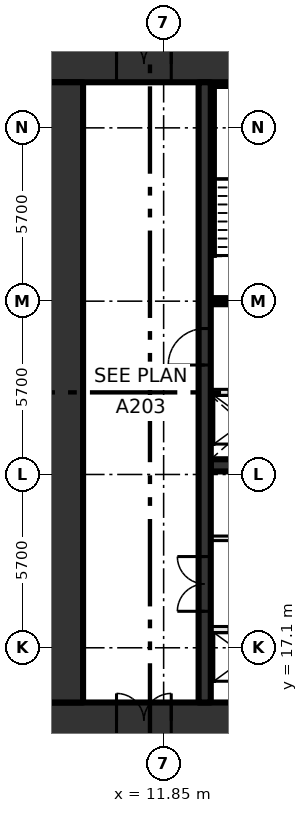
"""IFC4 building model, lengths in metres.
Left out: names, types, materials, properties, quantities, classifications, styles, units other than length and angle.
Written with IfcOpenShell. Run it as: python <this file> out.ifc"""

import sys

from ifc_helpers import new_model, si_unit, direction, frame, frame_2d, origin, place, context, subcontext, project, spatial, rectangle, extrude, element, fill, save


model = new_model("IFC4")
c1 = context("Model", 3, precision=1e-05, world=origin(), true_north=direction((0.0, 1.0)))
c2 = subcontext(c1, "Body", "Model", "MODEL_VIEW")
j1 = project(units=[si_unit("LENGTHUNIT", "METRE"), si_unit("PLANEANGLEUNIT", "RADIAN")], contexts=[c1])
p1 = place(None, origin())
s1 = spatial("IfcSite", under=j1, at=p1, CompositionType="ELEMENT")
p2 = place(p1, origin())
s2 = spatial("IfcBuilding", under=s1, at=p2, CompositionType="ELEMENT")
p3 = place(p2, origin())
s3 = spatial("IfcBuildingStorey", under=s2, at=p3, CompositionType="ELEMENT", Elevation=0.0)
p4 = place(p3, frame((8.0, 14.7, -0.45), z_axis=(0.0, 0.0, 1.0), x_axis=(1.0, 0.0, 0.0)))
e1 = element("IfcWall", 1, at=p4, inside=s3, PredefinedType="SHEAR", context=c2, shape_type="SweptSolid", body=[
    extrude(rectangle(XDim=22.8, YDim=1.2, at=frame_2d((11.4, 0.0))), origin(), (0.0, 0.0, 1.0), 7.2),
])
p5 = place(p4, frame((2.3, 0.0, 0.45)))
e2 = element("IfcOpeningElement", 2, at=p5, cuts=e1, PredefinedType="OPENING", context=c2, shape_type="SweptSolid", body=[
    extrude(rectangle(XDim=1.8, YDim=2.1, at=frame_2d((0.9, 1.05))), frame((0.0, 0.61, 0.0), z_axis=(0.0, -1.0, 0.0), x_axis=(1.0, 0.0, 0.0)), (0.0, 0.0, 1.0), 1.22),
])
p6 = place(p3, frame((8.0, 36.3, -0.45), z_axis=(0.0, 0.0, 1.0), x_axis=(1.0, 0.0, 0.0)))
e3 = element("IfcWall", 3, at=p6, inside=s3, PredefinedType="SHEAR", context=c2, shape_type="SweptSolid", body=[
    extrude(rectangle(XDim=22.8, YDim=1.2, at=frame_2d((11.4, 0.0))), origin(), (0.0, 0.0, 1.0), 7.2),
])
p7 = place(p6, frame((2.3, 0.0, 0.45)))
e4 = element("IfcOpeningElement", 4, at=p7, cuts=e3, PredefinedType="OPENING", context=c2, shape_type="SweptSolid", body=[
    extrude(rectangle(XDim=1.8, YDim=2.1, at=frame_2d((0.9, 1.05))), frame((0.0, 0.61, 0.0), z_axis=(0.0, -1.0, 0.0), x_axis=(1.0, 0.0, 0.0)), (0.0, 0.0, 1.0), 1.22),
])
p8 = place(p3, frame((8.6, 15.3, -0.45), z_axis=(0.0, 0.0, 1.0), x_axis=(0.0, 1.0, 0.0)))
e5 = element("IfcWall", 5, at=p8, inside=s3, PredefinedType="SHEAR", context=c2, shape_type="SweptSolid", body=[
    extrude(rectangle(XDim=20.4, YDim=1.2, at=frame_2d((10.2, 0.0))), origin(), (0.0, 0.0, 1.0), 7.2),
])
p9 = place(p3, frame((13.4, 17.7, 0.0), z_axis=(0.0, 0.0, 1.0), x_axis=(1.0, 0.0, 0.0)))
e6 = element("IfcWall", 6, at=p9, inside=s3, PredefinedType="SOLIDWALL", context=c2, shape_type="SweptSolid", body=[
    extrude(rectangle(XDim=13.4, YDim=0.2, at=frame_2d((6.7, 0.0))), origin(), (0.0, 0.0, 1.0), 6.75),
])
p10 = place(p9, frame((0.6, 0.0, 0.0)))
e7 = element("IfcOpeningElement", 7, at=p10, cuts=e6, PredefinedType="OPENING", context=c2, shape_type="SweptSolid", body=[
    extrude(rectangle(XDim=1.1, YDim=2.1, at=frame_2d((0.55, 1.05))), frame((0.0, 0.11, 0.0), z_axis=(0.0, -1.0, 0.0), x_axis=(1.0, 0.0, 0.0)), (0.0, 0.0, 1.0), 0.22),
])
p11 = place(p9, frame((3.3, 0.0, 0.0)))
e8 = element("IfcOpeningElement", 8, at=p11, cuts=e6, PredefinedType="OPENING", context=c2, shape_type="SweptSolid", body=[
    extrude(rectangle(XDim=1.1, YDim=2.1, at=frame_2d((0.55, 1.05))), frame((0.0, 0.11, 0.0), z_axis=(0.0, -1.0, 0.0), x_axis=(1.0, 0.0, 0.0)), (0.0, 0.0, 1.0), 0.22),
])
p12 = place(p9, frame((6.0, 0.0, 0.0)))
e9 = element("IfcOpeningElement", 9, at=p12, cuts=e6, PredefinedType="OPENING", context=c2, shape_type="SweptSolid", body=[
    extrude(rectangle(XDim=1.1, YDim=2.1, at=frame_2d((0.55, 1.05))), frame((0.0, 0.11, 0.0), z_axis=(0.0, -1.0, 0.0), x_axis=(1.0, 0.0, 0.0)), (0.0, 0.0, 1.0), 0.22),
])
p13 = place(p9, frame((8.7, 0.0, 0.0)))
e10 = element("IfcOpeningElement", 10, at=p13, cuts=e6, PredefinedType="OPENING", context=c2, shape_type="SweptSolid", body=[
    extrude(rectangle(XDim=1.1, YDim=2.1, at=frame_2d((0.55, 1.05))), frame((0.0, 0.11, 0.0), z_axis=(0.0, -1.0, 0.0), x_axis=(1.0, 0.0, 0.0)), (0.0, 0.0, 1.0), 0.22),
])
p14 = place(p9, frame((11.4, 0.0, 0.0)))
e11 = element("IfcOpeningElement", 11, at=p14, cuts=e6, PredefinedType="OPENING", context=c2, shape_type="SweptSolid", body=[
    extrude(rectangle(XDim=1.1, YDim=2.1, at=frame_2d((0.55, 1.05))), frame((0.0, 0.11, 0.0), z_axis=(0.0, -1.0, 0.0), x_axis=(1.0, 0.0, 0.0)), (0.0, 0.0, 1.0), 0.22),
])
p15 = place(p3, frame((13.4, 20.7, 0.0), z_axis=(0.0, 0.0, 1.0), x_axis=(1.0, 0.0, 0.0)))
e12 = element("IfcWall", 12, at=p15, inside=s3, PredefinedType="PARTITIONING", context=c2, shape_type="SweptSolid", body=[
    extrude(rectangle(XDim=13.4, YDim=0.15, at=frame_2d((6.7, 0.0))), origin(), (0.0, 0.0, 1.0), 6.75),
])
p16 = place(p15, frame((4.75, 0.0, 0.0)))
e13 = element("IfcOpeningElement", 13, at=p16, cuts=e12, PredefinedType="OPENING", context=c2, shape_type="SweptSolid", body=[
    extrude(rectangle(XDim=0.9, YDim=2.1, at=frame_2d((0.45, 1.05))), frame((0.0, 0.085, 0.0), z_axis=(0.0, -1.0, 0.0), x_axis=(1.0, 0.0, 0.0)), (0.0, 0.0, 1.0), 0.17),
])
p17 = place(p15, frame((11.5, 0.0, 0.0)))
e14 = element("IfcOpeningElement", 14, at=p17, cuts=e12, PredefinedType="OPENING", context=c2, shape_type="SweptSolid", body=[
    extrude(rectangle(XDim=0.9, YDim=2.1, at=frame_2d((0.45, 1.05))), frame((0.0, 0.085, 0.0), z_axis=(0.0, -1.0, 0.0), x_axis=(1.0, 0.0, 0.0)), (0.0, 0.0, 1.0), 0.17),
])
p18 = place(p3, frame((13.4, 23.1, 0.0), z_axis=(0.0, 0.0, 1.0), x_axis=(1.0, 0.0, 0.0)))
e15 = element("IfcWall", 15, at=p18, inside=s3, PredefinedType="SHEAR", context=c2, shape_type="SweptSolid", body=[
    extrude(rectangle(XDim=16.2, YDim=0.4, at=frame_2d((8.1, 0.0))), origin(), (0.0, 0.0, 1.0), 6.75),
])
p19 = place(p3, frame((13.4, 25.5, 0.0), z_axis=(0.0, 0.0, 1.0), x_axis=(1.0, 0.0, 0.0)))
e16 = element("IfcWall", 16, at=p19, inside=s3, PredefinedType="SOLIDWALL", context=c2, shape_type="SweptSolid", body=[
    extrude(rectangle(XDim=16.2, YDim=0.2, at=frame_2d((8.1, 0.0))), origin(), (0.0, 0.0, 1.0), 6.75),
])
p20 = place(p19, frame((0.6, 0.0, 0.0)))
e17 = element("IfcOpeningElement", 17, at=p20, cuts=e16, PredefinedType="OPENING", context=c2, shape_type="SweptSolid", body=[
    extrude(rectangle(XDim=1.1, YDim=2.1, at=frame_2d((0.55, 1.05))), frame((0.0, 0.11, 0.0), z_axis=(0.0, -1.0, 0.0), x_axis=(1.0, 0.0, 0.0)), (0.0, 0.0, 1.0), 0.22),
])
p21 = place(p19, frame((3.3, 0.0, 0.0)))
e18 = element("IfcOpeningElement", 18, at=p21, cuts=e16, PredefinedType="OPENING", context=c2, shape_type="SweptSolid", body=[
    extrude(rectangle(XDim=1.1, YDim=2.1, at=frame_2d((0.55, 1.05))), frame((0.0, 0.11, 0.0), z_axis=(0.0, -1.0, 0.0), x_axis=(1.0, 0.0, 0.0)), (0.0, 0.0, 1.0), 0.22),
])
p22 = place(p19, frame((6.0, 0.0, 0.0)))
e19 = element("IfcOpeningElement", 19, at=p22, cuts=e16, PredefinedType="OPENING", context=c2, shape_type="SweptSolid", body=[
    extrude(rectangle(XDim=1.1, YDim=2.1, at=frame_2d((0.55, 1.05))), frame((0.0, 0.11, 0.0), z_axis=(0.0, -1.0, 0.0), x_axis=(1.0, 0.0, 0.0)), (0.0, 0.0, 1.0), 0.22),
])
p23 = place(p19, frame((8.7, 0.0, 0.0)))
e20 = element("IfcOpeningElement", 20, at=p23, cuts=e16, PredefinedType="OPENING", context=c2, shape_type="SweptSolid", body=[
    extrude(rectangle(XDim=1.1, YDim=2.1, at=frame_2d((0.55, 1.05))), frame((0.0, 0.11, 0.0), z_axis=(0.0, -1.0, 0.0), x_axis=(1.0, 0.0, 0.0)), (0.0, 0.0, 1.0), 0.22),
])
p24 = place(p19, frame((11.4, 0.0, 0.0)))
e21 = element("IfcOpeningElement", 21, at=p24, cuts=e16, PredefinedType="OPENING", context=c2, shape_type="SweptSolid", body=[
    extrude(rectangle(XDim=1.1, YDim=2.1, at=frame_2d((0.55, 1.05))), frame((0.0, 0.11, 0.0), z_axis=(0.0, -1.0, 0.0), x_axis=(1.0, 0.0, 0.0)), (0.0, 0.0, 1.0), 0.22),
])
p25 = place(p19, frame((14.2, 0.0, 0.0)))
e22 = element("IfcOpeningElement", 22, at=p25, cuts=e16, PredefinedType="OPENING", context=c2, shape_type="SweptSolid", body=[
    extrude(rectangle(XDim=1.1, YDim=2.1, at=frame_2d((0.55, 1.05))), frame((0.0, 0.11, 0.0), z_axis=(0.0, -1.0, 0.0), x_axis=(1.0, 0.0, 0.0)), (0.0, 0.0, 1.0), 0.22),
])
p26 = place(p3, frame((13.4, 28.5, 0.0), z_axis=(0.0, 0.0, 1.0), x_axis=(1.0, 0.0, 0.0)))
e23 = element("IfcWall", 23, at=p26, inside=s3, PredefinedType="SOLIDWALL", context=c2, shape_type="SweptSolid", body=[
    extrude(rectangle(XDim=6.7, YDim=0.2, at=frame_2d((3.35, 0.0))), origin(), (0.0, 0.0, 1.0), 6.75),
])
p27 = place(p26, frame((0.9, 0.0, 0.0)))
e24 = element("IfcOpeningElement", 24, at=p27, cuts=e23, PredefinedType="OPENING", context=c2, shape_type="SweptSolid", body=[
    extrude(rectangle(XDim=1.2, YDim=2.1, at=frame_2d((0.6, 1.05))), frame((0.0, 0.11, 0.0), z_axis=(0.0, -1.0, 0.0), x_axis=(1.0, 0.0, 0.0)), (0.0, 0.0, 1.0), 0.22),
])
p28 = place(p26, frame((3.7, 0.0, 0.0)))
e25 = element("IfcOpeningElement", 25, at=p28, cuts=e23, PredefinedType="OPENING", context=c2, shape_type="SweptSolid", body=[
    extrude(rectangle(XDim=1.1, YDim=2.1, at=frame_2d((0.55, 1.05))), frame((0.0, 0.11, 0.0), z_axis=(0.0, -1.0, 0.0), x_axis=(1.0, 0.0, 0.0)), (0.0, 0.0, 1.0), 0.22),
])
p29 = place(p3, frame((13.2, 15.3, 0.0), z_axis=(0.0, 0.0, 1.0), x_axis=(0.0, 1.0, 0.0)))
e26 = element("IfcWall", 26, at=p29, inside=s3, PredefinedType="SHEAR", context=c2, shape_type="SweptSolid", body=[
    extrude(rectangle(XDim=20.4, YDim=0.4, at=frame_2d((10.2, 0.0))), origin(), (0.0, 0.0, 1.0), 6.75),
])
p30 = place(p29, frame((3.0, 0.0, 0.0)))
e27 = element("IfcOpeningElement", 27, at=p30, cuts=e26, PredefinedType="OPENING", context=c2, shape_type="SweptSolid", body=[
    extrude(rectangle(XDim=1.8, YDim=2.1, at=frame_2d((0.9, 1.05))), frame((0.0, 0.21, 0.0), z_axis=(0.0, -1.0, 0.0), x_axis=(1.0, 0.0, 0.0)), (0.0, 0.0, 1.0), 0.42),
])
p31 = place(p29, frame((11.1, 0.0, 0.0)))
e28 = element("IfcOpeningElement", 28, at=p31, cuts=e26, PredefinedType="OPENING", context=c2, shape_type="SweptSolid", body=[
    extrude(rectangle(XDim=1.2, YDim=2.1, at=frame_2d((0.6, 1.05))), frame((0.0, 0.21, 0.0), z_axis=(0.0, -1.0, 0.0), x_axis=(1.0, 0.0, 0.0)), (0.0, 0.0, 1.0), 0.42),
])
p32 = place(p30, origin())
e29 = element("IfcDoor", 29, at=p32, inside=s3, OperationType="DOUBLE_DOOR_SINGLE_SWING", PredefinedType="DOOR", context=c2, shape_type="SweptSolid", body=[
    extrude(rectangle(XDim=1.8, YDim=2.1, at=frame_2d((0.9, 1.05))), frame((0.0, 0.025, 0.0), z_axis=(0.0, -1.0, 0.0), x_axis=(1.0, 0.0, 0.0)), (0.0, 0.0, 1.0), 0.05),
])
fill(e27, e29)
p33 = place(p31, origin())
e30 = element("IfcDoor", 30, at=p33, inside=s3, OperationType="SINGLE_SWING_LEFT", PredefinedType="DOOR", context=c2, shape_type="SweptSolid", body=[
    extrude(rectangle(XDim=1.2, YDim=2.1, at=frame_2d((0.6, 1.05))), frame((0.0, 0.025, 0.0), z_axis=(0.0, -1.0, 0.0), x_axis=(1.0, 0.0, 0.0)), (0.0, 0.0, 1.0), 0.05),
])
fill(e28, e30)
p34 = place(p7, origin())
e31 = element("IfcDoor", 31, at=p34, inside=s3, OperationType="DOUBLE_DOOR_SINGLE_SWING", PredefinedType="DOOR", context=c2, shape_type="SweptSolid", body=[
    extrude(rectangle(XDim=1.8, YDim=2.1, at=frame_2d((0.9, 1.05))), frame((0.0, 0.025, 0.0), z_axis=(0.0, -1.0, 0.0), x_axis=(1.0, 0.0, 0.0)), (0.0, 0.0, 1.0), 0.05),
])
fill(e4, e31)
p35 = place(p5, origin())
e32 = element("IfcDoor", 32, at=p35, inside=s3, OperationType="DOUBLE_DOOR_SINGLE_SWING", PredefinedType="DOOR", context=c2, shape_type="SweptSolid", body=[
    extrude(rectangle(XDim=1.8, YDim=2.1, at=frame_2d((0.9, 1.05))), frame((0.0, 0.025, 0.0), z_axis=(0.0, -1.0, 0.0), x_axis=(1.0, 0.0, 0.0)), (0.0, 0.0, 1.0), 0.05),
])
fill(e2, e32)
save(model, sys.argv[1])
